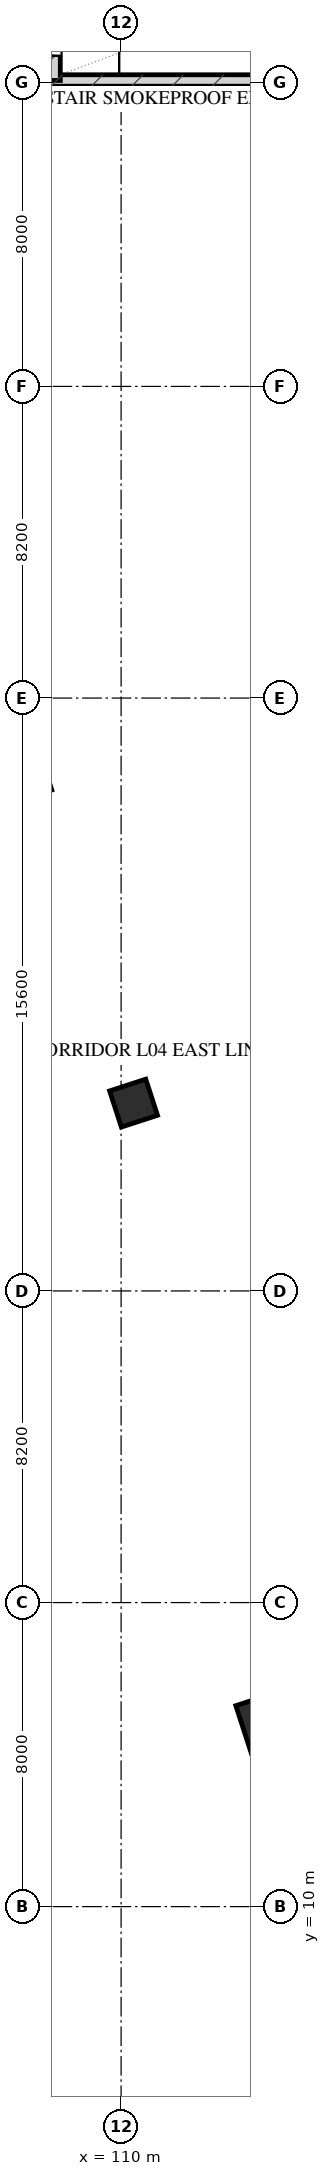
"""IFC4 building model, lengths in metres.
Left out: names, types, materials, properties, quantities, classifications, styles, units other than length and angle.
Written with IfcOpenShell. Run it as: python <this file> out.ifc"""

import sys

from ifc_helpers import new_model, si_unit, direction, frame, frame_2d, origin, origin_2d, place, context, subcontext, project, spatial, rectangle, hollow_rectangle, extrude, element, fill, save


model = new_model("IFC4")
c1 = context("Model", 3, precision=1e-05, world=origin(), true_north=direction((0.0, 1.0)))
c2 = subcontext(c1, "Body", "Model", "MODEL_VIEW")
j1 = project(units=[si_unit("LENGTHUNIT", "METRE"), si_unit("PLANEANGLEUNIT", "RADIAN")], contexts=[c1])
p1 = place(None, origin())
s1 = spatial("IfcSite", under=j1, at=p1, CompositionType="ELEMENT")
p2 = place(p1, origin())
s2 = spatial("IfcBuilding", under=s1, at=p2, CompositionType="ELEMENT")
p3 = place(p2, frame((0.0, 0.0, 22.0)))
s3 = spatial("IfcBuildingStorey", under=s2, at=p3, CompositionType="ELEMENT", Elevation=22.0)
p4 = place(p3, frame((108.1, 58.05, 0.0), z_axis=(0.0, 0.0, 1.0), x_axis=(1.0, 0.0, 0.0)))
e1 = element("IfcWall", 1, at=p4, inside=s3, PredefinedType="SHEAR", context=c2, shape_type="SweptSolid", body=[
    extrude(rectangle(XDim=8.9, YDim=0.3, at=frame_2d((4.45, 0.0))), origin(), (0.0, 0.0, 1.0), 4.0),
])
p5 = place(p3, frame((108.25, 58.05, 0.0), z_axis=(0.0, 0.0, 1.0), x_axis=(0.0, 1.0, 0.0)))
e2 = element("IfcWall", 2, at=p5, inside=s3, PredefinedType="SHEAR", context=c2, shape_type="SweptSolid", body=[
    extrude(rectangle(XDim=3.4, YDim=0.3, at=frame_2d((1.7, 0.0))), origin(), (0.0, 0.0, 1.0), 4.0),
])
p6 = place(p5, frame((0.65, 0.0, 0.0)))
e3 = element("IfcOpeningElement", 3, at=p6, cuts=e2, PredefinedType="OPENING", context=c2, shape_type="SweptSolid", body=[
    extrude(rectangle(XDim=1.2, YDim=2.05, at=frame_2d((0.6, 1.025))), frame((0.0, 0.16, 0.0), z_axis=(0.0, -1.0, 0.0), x_axis=(1.0, 0.0, 0.0)), (0.0, 0.0, 1.0), 0.32),
])
p7 = place(p3, frame((114.027, 14.774, 0.0), z_axis=(0.0, 0.0, 1.0), x_axis=(0.951056516295, 0.309016994375, 0.0)))
e4 = element("IfcColumn", 4, at=p7, inside=s3, PredefinedType="COLUMN", context=c2, shape_type="SweptSolid", body=[
    extrude(hollow_rectangle(XDim=1.6, YDim=1.6, WallThickness=0.055, at=origin_2d()), origin(), (0.0, 0.0, 1.0), 4.001),
])
p8 = place(p3, frame((110.328, 31.142, 0.0), z_axis=(0.0, 0.0, 1.0), x_axis=(0.951056516295, 0.309016994375, 0.0)))
e5 = element("IfcColumn", 5, at=p8, inside=s3, PredefinedType="COLUMN", context=c2, shape_type="SweptSolid", body=[
    extrude(hollow_rectangle(XDim=1.0, YDim=1.0, WallThickness=0.036, at=origin_2d()), origin(), (0.0, 0.0, 1.0), 4.001),
])
p9 = place(p6, origin())
e6 = element("IfcDoor", 6, at=p9, inside=s3, OperationType="SINGLE_SWING_LEFT", PredefinedType="DOOR", context=c2, shape_type="SweptSolid", body=[
    extrude(rectangle(XDim=1.2, YDim=2.05, at=frame_2d((0.6, 1.025))), frame((0.0, 0.025, 0.0), z_axis=(0.0, -1.0, 0.0), x_axis=(1.0, 0.0, 0.0)), (0.0, 0.0, 1.0), 0.05),
])
fill(e3, e6)
save(model, sys.argv[1])
